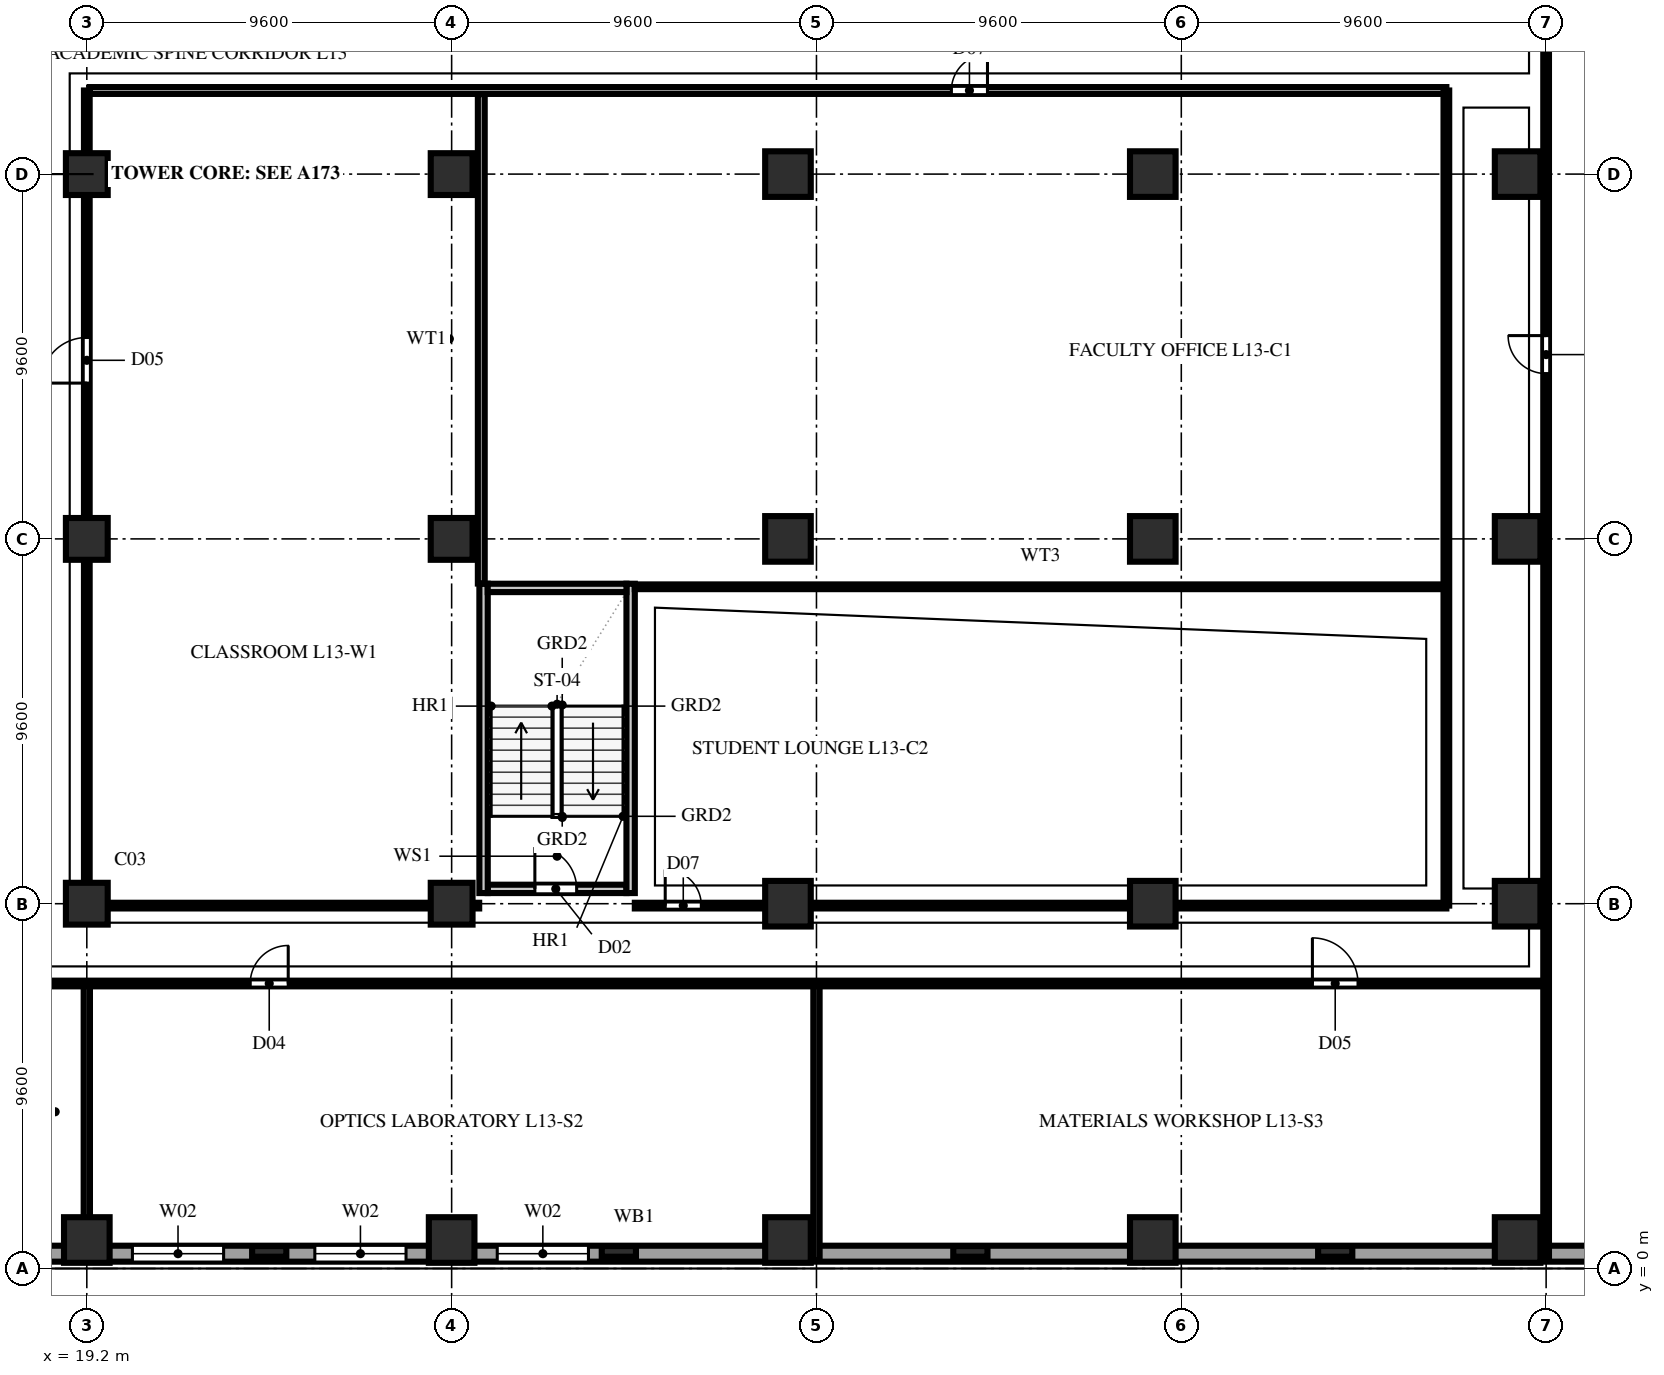
"""IFC4 building model, lengths in metres.
Left out: names, types, materials, properties, quantities, classifications, styles, units other than length and angle.
Written with IfcOpenShell. Run it as: python <this file> out.ifc"""

import sys

from ifc_helpers import new_model, si_unit, direction, frame, frame_2d, origin, origin_2d, place, context, subcontext, project, spatial, rectangle, extrude, element, fill, save


model = new_model("IFC4")
c1 = context("Model", 3, precision=1e-05, world=origin(), true_north=direction((0.0, 1.0)))
c2 = subcontext(c1, "Body", "Model", "MODEL_VIEW")
j1 = project(units=[si_unit("LENGTHUNIT", "METRE"), si_unit("PLANEANGLEUNIT", "RADIAN")], contexts=[c1])
p1 = place(None, origin())
s1 = spatial("IfcSite", under=j1, at=p1, CompositionType="ELEMENT")
p2 = place(p1, origin())
s2 = spatial("IfcBuilding", under=s1, at=p2, CompositionType="ELEMENT")
p3 = place(p2, frame((0.0, 0.0, 54.6)))
s3 = spatial("IfcBuildingStorey", under=s2, at=p3, CompositionType="ELEMENT", Elevation=54.6)
p4 = place(p3, frame((19.2, 0.75, 0.0), z_axis=(0.0, 0.0, 1.0), x_axis=(1.0, 0.0, 0.0)))
e1 = element("IfcColumn", 1, at=p4, inside=s3, PredefinedType="COLUMN", context=c2, shape_type="SweptSolid", body=[
    extrude(rectangle(XDim=1.2, YDim=1.2, at=origin_2d()), origin(), (0.0, 0.0, 1.0), 3.8),
])
for number, where, z_axis, x_axis in (
    (2, (19.2, 9.6, 0.0), (0.0, 0.0, 1.0), (1.0, 0.0, 0.0)),
    (3, (19.2, 19.2, 0.0), (0.0, 0.0, 1.0), (1.0, 0.0, 0.0)),
    (4, (19.2, 28.8, 0.0), (0.0, 0.0, 1.0), (1.0, 0.0, 0.0)),
):
    element("IfcColumn", number, at=place(p3, frame(where, z_axis=z_axis, x_axis=x_axis)), inside=s3, PredefinedType="COLUMN", context=c2, shape_type="SweptSolid", body=[
        extrude(rectangle(XDim=1.1, YDim=1.1, at=origin_2d()), origin(), (0.0, 0.0, 1.0), 3.8),
    ])
p5 = place(p3, frame((28.8, 0.75, 0.0), z_axis=(0.0, 0.0, 1.0), x_axis=(1.0, 0.0, 0.0)))
e5 = element("IfcColumn", 5, at=p5, inside=s3, PredefinedType="COLUMN", context=c2, shape_type="SweptSolid", body=[
    extrude(rectangle(XDim=1.2, YDim=1.2, at=origin_2d()), origin(), (0.0, 0.0, 1.0), 3.8),
])
for number, where, z_axis, x_axis in (
    (6, (28.8, 9.6, 0.0), (0.0, 0.0, 1.0), (1.0, 0.0, 0.0)),
    (7, (28.8, 19.2, 0.0), (0.0, 0.0, 1.0), (1.0, 0.0, 0.0)),
    (8, (28.8, 28.8, 0.0), (0.0, 0.0, 1.0), (1.0, 0.0, 0.0)),
):
    element("IfcColumn", number, at=place(p3, frame(where, z_axis=z_axis, x_axis=x_axis)), inside=s3, PredefinedType="COLUMN", context=c2, shape_type="SweptSolid", body=[
        extrude(rectangle(XDim=1.1, YDim=1.1, at=origin_2d()), origin(), (0.0, 0.0, 1.0), 3.8),
    ])
for number, where, z_axis, x_axis in (
    (9, (37.65, 0.75, 0.0), (0.0, 0.0, 1.0), (1.0, 0.0, 0.0)),
    (10, (37.65, 9.6, 0.0), (0.0, 0.0, 1.0), (1.0, 0.0, 0.0)),
    (11, (37.65, 19.2, 0.0), (0.0, 0.0, 1.0), (1.0, 0.0, 0.0)),
    (12, (37.65, 28.8, 0.0), (0.0, 0.0, 1.0), (1.0, 0.0, 0.0)),
    (13, (47.25, 0.75, 0.0), (0.0, 0.0, 1.0), (1.0, 0.0, 0.0)),
    (14, (47.25, 9.6, 0.0), (0.0, 0.0, 1.0), (1.0, 0.0, 0.0)),
    (15, (47.25, 19.2, 0.0), (0.0, 0.0, 1.0), (1.0, 0.0, 0.0)),
    (16, (47.25, 28.8, 0.0), (0.0, 0.0, 1.0), (1.0, 0.0, 0.0)),
    (17, (56.85, 0.75, 0.0), (0.0, 0.0, 1.0), (1.0, 0.0, 0.0)),
    (18, (56.85, 9.6, 0.0), (0.0, 0.0, 1.0), (1.0, 0.0, 0.0)),
    (19, (56.85, 19.2, 0.0), (0.0, 0.0, 1.0), (1.0, 0.0, 0.0)),
    (20, (56.85, 28.8, 0.0), (0.0, 0.0, 1.0), (1.0, 0.0, 0.0)),
):
    element("IfcColumn", number, at=place(p3, frame(where, z_axis=z_axis, x_axis=x_axis)), inside=s3, PredefinedType="COLUMN", context=c2, shape_type="SweptSolid", body=[
        extrude(rectangle(XDim=1.2, YDim=1.2, at=origin_2d()), origin(), (0.0, 0.0, 1.0), 3.8),
    ])
for number, where, z_axis, x_axis in (
    (21, (24.0, 0.45, 0.0), (0.0, 0.0, 1.0), (1.0, 0.0, 0.0)),
    (22, (33.2, 0.45, 0.0), (0.0, 0.0, 1.0), (1.0, 0.0, 0.0)),
    (23, (42.45, 0.45, 0.0), (0.0, 0.0, 1.0), (1.0, 0.0, 0.0)),
    (24, (52.05, 0.45, 0.0), (0.0, 0.0, 1.0), (1.0, 0.0, 0.0)),
):
    element("IfcColumn", number, at=place(p3, frame(where, z_axis=z_axis, x_axis=x_axis)), inside=s3, PredefinedType="PILASTER", context=c2, shape_type="SweptSolid", body=[
        extrude(rectangle(XDim=0.9, YDim=0.28, at=origin_2d()), origin(), (0.0, 0.0, 1.0), 3.8),
    ])
p6 = place(p3, frame((1.84, 0.39, 0.0), z_axis=(0.0, 0.0, 1.0), x_axis=(1.0, 0.0, 0.0)))
e25 = element("IfcWall", 25, at=p6, inside=s3, PredefinedType="SOLIDWALL", context=c2, shape_type="SweptSolid", body=[
    extrude(rectangle(XDim=63.52, YDim=0.42, at=frame_2d((31.76, 0.0))), origin(), (0.0, 0.0, 1.0), 3.54),
])
p7 = place(p6, frame((4.16, 0.0, 0.85)))
e26 = element("IfcOpeningElement", 26, at=p7, cuts=e25, PredefinedType="OPENING", context=c2, shape_type="SweptSolid", body=[
    extrude(rectangle(XDim=2.4, YDim=1.85, at=frame_2d((1.2, 0.925))), frame((0.0, 0.222, 0.0), z_axis=(0.0, -1.0, 0.0), x_axis=(1.0, 0.0, 0.0)), (0.0, 0.0, 1.0), 0.444),
])
p8 = place(p6, frame((8.96, 0.0, 0.85)))
e27 = element("IfcOpeningElement", 27, at=p8, cuts=e25, PredefinedType="OPENING", context=c2, shape_type="SweptSolid", body=[
    extrude(rectangle(XDim=2.4, YDim=1.85, at=frame_2d((1.2, 0.925))), frame((0.0, 0.222, 0.0), z_axis=(0.0, -1.0, 0.0), x_axis=(1.0, 0.0, 0.0)), (0.0, 0.0, 1.0), 0.444),
])
p9 = place(p6, frame((13.76, 0.0, 0.85)))
e28 = element("IfcOpeningElement", 28, at=p9, cuts=e25, PredefinedType="OPENING", context=c2, shape_type="SweptSolid", body=[
    extrude(rectangle(XDim=2.4, YDim=1.85, at=frame_2d((1.2, 0.925))), frame((0.0, 0.222, 0.0), z_axis=(0.0, -1.0, 0.0), x_axis=(1.0, 0.0, 0.0)), (0.0, 0.0, 1.0), 0.444),
])
p10 = place(p6, frame((18.56, 0.0, 0.85)))
e29 = element("IfcOpeningElement", 29, at=p10, cuts=e25, PredefinedType="OPENING", context=c2, shape_type="SweptSolid", body=[
    extrude(rectangle(XDim=2.4, YDim=1.85, at=frame_2d((1.2, 0.925))), frame((0.0, 0.222, 0.0), z_axis=(0.0, -1.0, 0.0), x_axis=(1.0, 0.0, 0.0)), (0.0, 0.0, 1.0), 0.444),
])
p11 = place(p6, frame((23.36, 0.0, 0.85)))
e30 = element("IfcOpeningElement", 30, at=p11, cuts=e25, PredefinedType="OPENING", context=c2, shape_type="SweptSolid", body=[
    extrude(rectangle(XDim=2.4, YDim=1.85, at=frame_2d((1.2, 0.925))), frame((0.0, 0.222, 0.0), z_axis=(0.0, -1.0, 0.0), x_axis=(1.0, 0.0, 0.0)), (0.0, 0.0, 1.0), 0.444),
])
p12 = place(p6, frame((28.16, 0.0, 0.85)))
e31 = element("IfcOpeningElement", 31, at=p12, cuts=e25, PredefinedType="OPENING", context=c2, shape_type="SweptSolid", body=[
    extrude(rectangle(XDim=2.4, YDim=1.85, at=frame_2d((1.2, 0.925))), frame((0.0, 0.222, 0.0), z_axis=(0.0, -1.0, 0.0), x_axis=(1.0, 0.0, 0.0)), (0.0, 0.0, 1.0), 0.444),
])
p13 = place(p3, frame((29.75, 9.99, 0.0), z_axis=(0.0, 0.0, 1.0), x_axis=(1.0, 0.0, 0.0)))
e32 = element("IfcWall", 32, at=p13, inside=s3, PredefinedType="SOLIDWALL", context=c2, shape_type="SweptSolid", body=[
    extrude(rectangle(XDim=3.65, YDim=0.22, at=frame_2d((1.825, 0.0))), origin(), (0.0, 0.0, 1.0), 3.54),
])
p14 = place(p13, frame((1.24, 0.0, 0.0)))
e33 = element("IfcOpeningElement", 33, at=p14, cuts=e32, PredefinedType="OPENING", context=c2, shape_type="SweptSolid", body=[
    extrude(rectangle(XDim=1.1, YDim=2.2, at=frame_2d((0.55, 1.1))), frame((0.0, 0.122, 0.0), z_axis=(0.0, -1.0, 0.0), x_axis=(1.0, 0.0, 0.0)), (0.0, 0.0, 1.0), 0.244),
])
for number, where, z_axis, x_axis in (
    (34, (29.64, 9.88, 0.0), (0.0, 0.0, 1.0), (0.0, 1.0, 0.0)),
    (35, (33.51, 9.88, 0.0), (0.0, 0.0, 1.0), (0.0, 1.0, 0.0)),
):
    element("IfcWall", number, at=place(p3, frame(where, z_axis=z_axis, x_axis=x_axis)), inside=s3, PredefinedType="SOLIDWALL", context=c2, shape_type="SweptSolid", body=[
        extrude(rectangle(XDim=8.14, YDim=0.22, at=frame_2d((4.07, 0.0))), origin(), (0.0, 0.0, 1.0), 3.54),
    ])
p15 = place(p3, frame((29.75, 17.91, 0.0), z_axis=(0.0, 0.0, 1.0), x_axis=(1.0, 0.0, 0.0)))
e36 = element("IfcWall", 36, at=p15, inside=s3, PredefinedType="SOLIDWALL", context=c2, shape_type="SweptSolid", body=[
    extrude(rectangle(XDim=3.65, YDim=0.22, at=frame_2d((1.825, 0.0))), origin(), (0.0, 0.0, 1.0), 3.54),
])
p16 = place(p3, frame((19.2, 0.22, 0.0), z_axis=(0.0, 0.0, 1.0), x_axis=(0.0, 1.0, 0.0)))
e37 = element("IfcWall", 37, at=p16, inside=s3, PredefinedType="PLUMBINGWALL", context=c2, shape_type="SweptSolid", body=[
    extrude(rectangle(XDim=0.53, YDim=0.165, at=frame_2d((0.265, 0.0))), origin(), (0.0, 0.0, 1.0), 3.54),
])
p17 = place(p3, frame((19.2, 0.75, 0.0), z_axis=(0.0, 0.0, 1.0), x_axis=(0.0, 1.0, 0.0)))
e38 = element("IfcWall", 38, at=p17, inside=s3, PredefinedType="PLUMBINGWALL", context=c2, shape_type="SweptSolid", body=[
    extrude(rectangle(XDim=6.75, YDim=0.165, at=frame_2d((3.375, 0.0))), origin(), (0.0, 0.0, 1.0), 3.232),
])
p18 = place(p3, frame((38.4, 0.22, 0.0), z_axis=(0.0, 0.0, 1.0), x_axis=(0.0, 1.0, 0.0)))
e39 = element("IfcWall", 39, at=p18, inside=s3, PredefinedType="PLUMBINGWALL", context=c2, shape_type="SweptSolid", body=[
    extrude(rectangle(XDim=7.28, YDim=0.165, at=frame_2d((3.64, 0.0))), origin(), (0.0, 0.0, 1.0), 3.54),
])
p19 = place(p3, frame((0.22, 7.5, 0.0), z_axis=(0.0, 0.0, 1.0), x_axis=(1.0, 0.0, 0.0)))
e40 = element("IfcWall", 40, at=p19, inside=s3, PredefinedType="PARTITIONING", context=c2, shape_type="SweptSolid", body=[
    extrude(rectangle(XDim=57.38, YDim=0.15, at=frame_2d((28.69, 0.0))), origin(), (0.0, 0.0, 1.0), 3.54),
])
p20 = place(p19, frame((13.68, 0.0, 0.0)))
e41 = element("IfcOpeningElement", 41, at=p20, cuts=e40, PredefinedType="OPENING", context=c2, shape_type="SweptSolid", body=[
    extrude(rectangle(XDim=1.0, YDim=2.2, at=frame_2d((0.5, 1.1))), frame((0.0, 0.087, 0.0), z_axis=(0.0, -1.0, 0.0), x_axis=(1.0, 0.0, 0.0)), (0.0, 0.0, 1.0), 0.174),
])
p21 = place(p19, frame((23.28, 0.0, 0.0)))
e42 = element("IfcOpeningElement", 42, at=p21, cuts=e40, PredefinedType="OPENING", context=c2, shape_type="SweptSolid", body=[
    extrude(rectangle(XDim=1.0, YDim=2.2, at=frame_2d((0.5, 1.1))), frame((0.0, 0.087, 0.0), z_axis=(0.0, -1.0, 0.0), x_axis=(1.0, 0.0, 0.0)), (0.0, 0.0, 1.0), 0.174),
])
p22 = place(p19, frame((51.23, 0.0, 0.0)))
e43 = element("IfcOpeningElement", 43, at=p22, cuts=e40, PredefinedType="OPENING", context=c2, shape_type="SweptSolid", body=[
    extrude(rectangle(XDim=1.2, YDim=2.2, at=frame_2d((0.6, 1.1))), frame((0.0, 0.087, 0.0), z_axis=(0.0, -1.0, 0.0), x_axis=(1.0, 0.0, 0.0)), (0.0, 0.0, 1.0), 0.174),
])
p23 = place(p3, frame((57.6, 0.22, 0.0), z_axis=(0.0, 0.0, 1.0), x_axis=(0.0, 1.0, 0.0)))
e44 = element("IfcWall", 44, at=p23, inside=s3, PredefinedType="PARTITIONING", context=c2, shape_type="SweptSolid", body=[
    extrude(rectangle(XDim=37.96, YDim=0.15, at=frame_2d((18.98, 0.0))), origin(), (0.0, 0.0, 1.0), 3.54),
])
p24 = place(p23, frame((23.33, 0.0, 0.0)))
e45 = element("IfcOpeningElement", 45, at=p24, cuts=e44, PredefinedType="OPENING", context=c2, shape_type="SweptSolid", body=[
    extrude(rectangle(XDim=1.0, YDim=2.2, at=frame_2d((0.5, 1.1))), frame((0.0, 0.087, 0.0), z_axis=(0.0, -1.0, 0.0), x_axis=(1.0, 0.0, 0.0)), (0.0, 0.0, 1.0), 0.174),
])
p25 = place(p3, frame((19.2, 9.55, 0.0), z_axis=(0.0, 0.0, 1.0), x_axis=(0.0, 1.0, 0.0)))
e46 = element("IfcWall", 46, at=p25, inside=s3, PredefinedType="PARTITIONING", context=c2, shape_type="SweptSolid", body=[
    extrude(rectangle(XDim=21.45, YDim=0.15, at=frame_2d((10.725, 0.0))), origin(), (0.0, 0.0, 1.0), 3.232),
])
p26 = place(p25, frame((13.75, 0.0, 0.0)))
e47 = element("IfcOpeningElement", 47, at=p26, cuts=e46, PredefinedType="OPENING", context=c2, shape_type="SweptSolid", body=[
    extrude(rectangle(XDim=1.2, YDim=2.2, at=frame_2d((0.6, 1.1))), frame((0.0, 0.087, 0.0), z_axis=(0.0, -1.0, 0.0), x_axis=(1.0, 0.0, 0.0)), (0.0, 0.0, 1.0), 0.174),
])
p27 = place(p3, frame((29.58, 18.025, 0.0), z_axis=(0.0, 0.0, 1.0), x_axis=(0.0, 1.0, 0.0)))
e48 = element("IfcWall", 48, at=p27, inside=s3, PredefinedType="PARTITIONING", context=c2, shape_type="SweptSolid", body=[
    extrude(rectangle(XDim=12.88, YDim=0.18, at=frame_2d((6.44, 0.0))), origin(), (0.0, 0.0, 1.0), 3.54),
])
p28 = place(p3, frame((19.28, 31.0, 0.0), z_axis=(0.0, 0.0, 1.0), x_axis=(1.0, 0.0, 0.0)))
e49 = element("IfcWall", 49, at=p28, inside=s3, PredefinedType="PARTITIONING", context=c2, shape_type="SweptSolid", body=[
    extrude(rectangle(XDim=35.695, YDim=0.18, at=frame_2d((17.848, 0.0))), origin(), (0.0, 0.0, 1.0), 3.54),
])
p29 = place(p28, frame((22.67, 0.0, 0.0)))
e50 = element("IfcOpeningElement", 50, at=p29, cuts=e49, PredefinedType="OPENING", context=c2, shape_type="SweptSolid", body=[
    extrude(rectangle(XDim=0.95, YDim=2.15, at=frame_2d((0.475, 1.075))), frame((0.0, 0.102, 0.0), z_axis=(0.0, -1.0, 0.0), x_axis=(1.0, 0.0, 0.0)), (0.0, 0.0, 1.0), 0.204),
])
p30 = place(p3, frame((19.28, 9.55, 0.0), z_axis=(0.0, 0.0, 1.0), x_axis=(1.0, 0.0, 0.0)))
e51 = element("IfcWall", 51, at=p30, inside=s3, PredefinedType="PARTITIONING", context=c2, shape_type="SweptSolid", body=[
    extrude(rectangle(XDim=10.245, YDim=0.15, at=frame_2d((5.123, 0.0))), origin(), (0.0, 0.0, 1.0), 3.232),
])
p31 = place(p3, frame((33.62, 17.94, 0.0), z_axis=(0.0, 0.0, 1.0), x_axis=(1.0, 0.0, 0.0)))
e52 = element("IfcWall", 52, at=p31, inside=s3, PredefinedType="PARTITIONING", context=c2, shape_type="SweptSolid", body=[
    extrude(rectangle(XDim=21.355, YDim=0.125, at=frame_2d((10.677, 0.0))), origin(), (0.0, 0.0, 1.0), 3.54),
])
p32 = place(p3, frame((33.62, 9.55, 0.0), z_axis=(0.0, 0.0, 1.0), x_axis=(1.0, 0.0, 0.0)))
e53 = element("IfcWall", 53, at=p32, inside=s3, PredefinedType="PARTITIONING", context=c2, shape_type="SweptSolid", body=[
    extrude(rectangle(XDim=21.355, YDim=0.15, at=frame_2d((10.677, 0.0))), origin(), (0.0, 0.0, 1.0), 3.232),
])
p33 = place(p32, frame((0.8, 0.0, 0.0)))
e54 = element("IfcOpeningElement", 54, at=p33, cuts=e53, PredefinedType="OPENING", context=c2, shape_type="SweptSolid", body=[
    extrude(rectangle(XDim=0.95, YDim=2.15, at=frame_2d((0.475, 1.075))), frame((0.0, 0.087, 0.0), z_axis=(0.0, -1.0, 0.0), x_axis=(1.0, 0.0, 0.0)), (0.0, 0.0, 1.0), 0.174),
])
p34 = place(p3, frame((54.975, 9.55, 0.0), z_axis=(0.0, 0.0, 1.0), x_axis=(0.0, 1.0, 0.0)))
e55 = element("IfcWall", 55, at=p34, inside=s3, PredefinedType="PARTITIONING", context=c2, shape_type="SweptSolid", body=[
    extrude(rectangle(XDim=21.45, YDim=0.15, at=frame_2d((10.725, 0.0))), origin(), (0.0, 0.0, 1.0), 3.54),
])
p35 = place(p10, origin())
e56 = element("IfcWindow", 56, at=p35, inside=s3, PartitioningType="TRIPLE_PANEL_VERTICAL", PredefinedType="WINDOW", context=c2, shape_type="SweptSolid", body=[
    extrude(rectangle(XDim=2.4, YDim=1.85, at=frame_2d((1.2, 0.925))), frame((0.0, 0.11, 0.0), z_axis=(0.0, -1.0, 0.0), x_axis=(1.0, 0.0, 0.0)), (0.0, 0.0, 1.0), 0.06),
])
fill(e29, e56)
p36 = place(p11, origin())
e57 = element("IfcWindow", 57, at=p36, inside=s3, PartitioningType="TRIPLE_PANEL_VERTICAL", PredefinedType="WINDOW", context=c2, shape_type="SweptSolid", body=[
    extrude(rectangle(XDim=2.4, YDim=1.85, at=frame_2d((1.2, 0.925))), frame((0.0, 0.11, 0.0), z_axis=(0.0, -1.0, 0.0), x_axis=(1.0, 0.0, 0.0)), (0.0, 0.0, 1.0), 0.06),
])
fill(e30, e57)
p37 = place(p12, origin())
e58 = element("IfcWindow", 58, at=p37, inside=s3, PartitioningType="TRIPLE_PANEL_VERTICAL", PredefinedType="WINDOW", context=c2, shape_type="SweptSolid", body=[
    extrude(rectangle(XDim=2.4, YDim=1.85, at=frame_2d((1.2, 0.925))), frame((0.0, 0.11, 0.0), z_axis=(0.0, -1.0, 0.0), x_axis=(1.0, 0.0, 0.0)), (0.0, 0.0, 1.0), 0.06),
])
fill(e31, e58)
p38 = place(p14, origin())
e59 = element("IfcDoor", 59, at=p38, inside=s3, OperationType="SINGLE_SWING_LEFT", PredefinedType="DOOR", context=c2, shape_type="SweptSolid", body=[
    extrude(rectangle(XDim=1.1, YDim=2.2, at=frame_2d((0.55, 1.1))), frame((0.0, 0.025, 0.0), z_axis=(0.0, -1.0, 0.0), x_axis=(1.0, 0.0, 0.0)), (0.0, 0.0, 1.0), 0.05),
])
fill(e33, e59)
p39 = place(p21, origin())
e60 = element("IfcDoor", 60, at=p39, inside=s3, OperationType="SINGLE_SWING_RIGHT", PredefinedType="DOOR", context=c2, shape_type="SweptSolid", body=[
    extrude(rectangle(XDim=1.0, YDim=2.2, at=frame_2d((0.5, 1.1))), frame((0.0, 0.025, 0.0), z_axis=(0.0, -1.0, 0.0), x_axis=(1.0, 0.0, 0.0)), (0.0, 0.0, 1.0), 0.05),
])
fill(e42, e60)
p40 = place(p22, origin())
e61 = element("IfcDoor", 61, at=p40, inside=s3, OperationType="SINGLE_SWING_LEFT", PredefinedType="DOOR", context=c2, shape_type="SweptSolid", body=[
    extrude(rectangle(XDim=1.2, YDim=2.2, at=frame_2d((0.6, 1.1))), frame((0.0, 0.025, 0.0), z_axis=(0.0, -1.0, 0.0), x_axis=(1.0, 0.0, 0.0)), (0.0, 0.0, 1.0), 0.05),
])
fill(e43, e61)
p41 = place(p24, origin())
e62 = element("IfcDoor", 62, at=p41, inside=s3, OperationType="SINGLE_SWING_RIGHT", PredefinedType="DOOR", context=c2, shape_type="SweptSolid", body=[
    extrude(rectangle(XDim=1.0, YDim=2.2, at=frame_2d((0.5, 1.1))), frame((0.0, 0.025, 0.0), z_axis=(0.0, -1.0, 0.0), x_axis=(1.0, 0.0, 0.0)), (0.0, 0.0, 1.0), 0.05),
])
fill(e45, e62)
p42 = place(p26, origin())
e63 = element("IfcDoor", 63, at=p42, inside=s3, OperationType="SINGLE_SWING_LEFT", PredefinedType="DOOR", context=c2, shape_type="SweptSolid", body=[
    extrude(rectangle(XDim=1.2, YDim=2.2, at=frame_2d((0.6, 1.1))), frame((0.0, 0.025, 0.0), z_axis=(0.0, -1.0, 0.0), x_axis=(1.0, 0.0, 0.0)), (0.0, 0.0, 1.0), 0.05),
])
fill(e47, e63)
p43 = place(p29, origin())
e64 = element("IfcDoor", 64, at=p43, inside=s3, OperationType="SINGLE_SWING_RIGHT", PredefinedType="DOOR", context=c2, shape_type="SweptSolid", body=[
    extrude(rectangle(XDim=0.95, YDim=2.15, at=frame_2d((0.475, 1.075))), frame((0.0, 0.025, 0.0), z_axis=(0.0, -1.0, 0.0), x_axis=(1.0, 0.0, 0.0)), (0.0, 0.0, 1.0), 0.05),
])
fill(e50, e64)
p44 = place(p33, origin())
e65 = element("IfcDoor", 65, at=p44, inside=s3, OperationType="SINGLE_SWING_LEFT", PredefinedType="DOOR", context=c2, shape_type="SweptSolid", body=[
    extrude(rectangle(XDim=0.95, YDim=2.15, at=frame_2d((0.475, 1.075))), frame((0.0, 0.025, 0.0), z_axis=(0.0, -1.0, 0.0), x_axis=(1.0, 0.0, 0.0)), (0.0, 0.0, 1.0), 0.05),
])
fill(e54, e65)
save(model, sys.argv[1])
